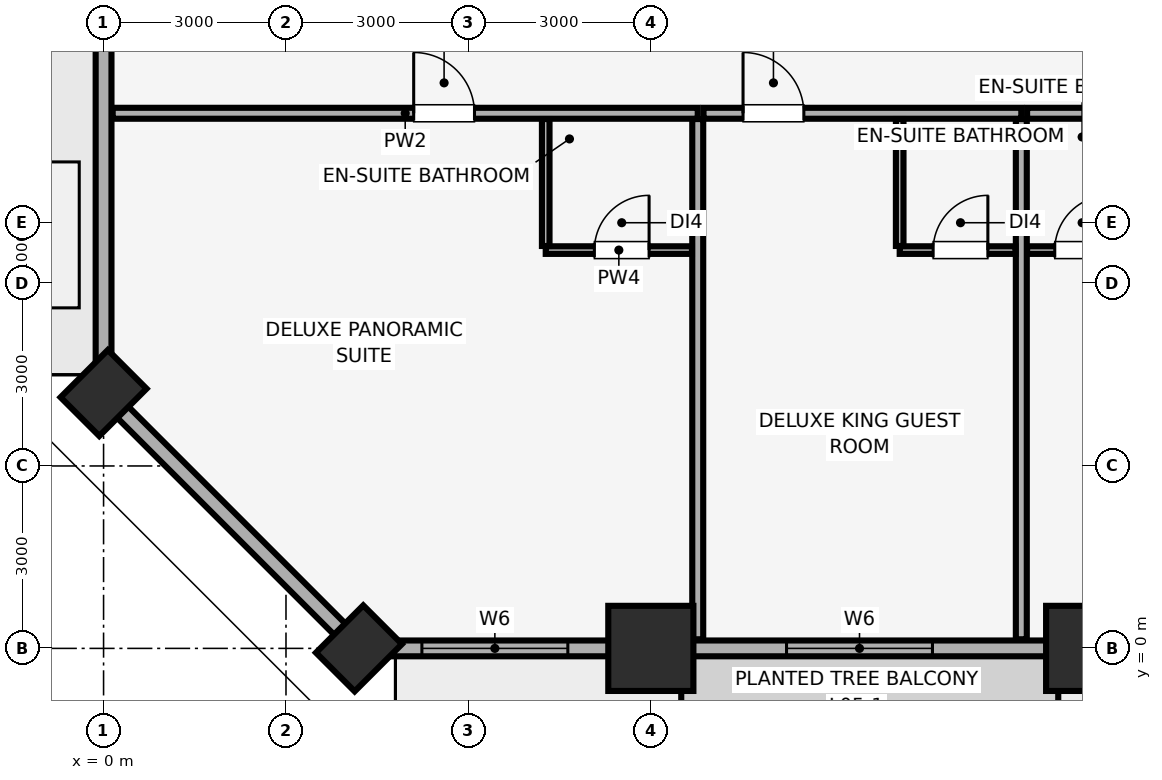
"""IFC4 building model, lengths in metres.
Left out: names, types, materials, properties, quantities, classifications, styles, units other than length and angle.
Written with IfcOpenShell. Run it as: python <this file> out.ifc"""

import sys

from ifc_helpers import new_model, si_unit, direction, frame, frame_2d, origin, origin_2d, place, context, subcontext, project, spatial, rectangle, extrude, element, fill, save


model = new_model("IFC4")
c1 = context("Model", 3, precision=1e-05, world=origin(), true_north=direction((0.0, 1.0)))
c2 = subcontext(c1, "Body", "Model", "MODEL_VIEW")
j1 = project(units=[si_unit("LENGTHUNIT", "METRE"), si_unit("PLANEANGLEUNIT", "RADIAN")], contexts=[c1])
p1 = place(None, origin())
s1 = spatial("IfcSite", under=j1, at=p1, CompositionType="ELEMENT")
p2 = place(p1, origin())
s2 = spatial("IfcBuilding", under=s1, at=p2, CompositionType="ELEMENT")
p3 = place(p2, frame((0.0, 0.0, 31.4)))
s3 = spatial("IfcBuildingStorey", under=s2, at=p3, CompositionType="ELEMENT", Elevation=31.4)
for number, where, z_axis, x_axis in (
    (1, (9.0, 0.0, 0.0), (0.0, 0.0, 1.0), (1.0, 0.0, 0.0)),
    (2, (16.2, 0.0, 0.0), (0.0, 0.0, 1.0), (1.0, 0.0, 0.0)),
):
    element("IfcColumn", number, at=place(p3, frame(where, z_axis=z_axis, x_axis=x_axis)), inside=s3, PredefinedType="COLUMN", context=c2, shape_type="SweptSolid", body=[
        extrude(rectangle(XDim=1.4, YDim=1.4, at=origin_2d()), origin(), (0.0, 0.0, 1.0), 3.51),
    ])
for number, where, z_axis, x_axis in (
    (3, (4.2, 0.0, 0.0), (0.0, 0.0, 1.0), (0.707, 0.707, 0.0)),
    (4, (0.0, 4.2, 0.0), (0.0, 0.0, 1.0), (0.707, 0.707, 0.0)),
):
    element("IfcColumn", number, at=place(p3, frame(where, z_axis=z_axis, x_axis=x_axis)), inside=s3, PredefinedType="PILASTER", context=c2, shape_type="SweptSolid", body=[
        extrude(rectangle(XDim=1.1, YDim=0.9, at=origin_2d()), origin(), (0.0, 0.0, 1.0), 3.51),
    ])
p4 = place(p3, frame((4.2, 0.0, 0.0), z_axis=(0.0, 0.0, 1.0), x_axis=(1.0, 0.0, 0.0)))
e5 = element("IfcWall", 5, at=p4, inside=s3, PredefinedType="SOLIDWALL", context=c2, shape_type="SweptSolid", body=[
    extrude(rectangle(XDim=75.6, YDim=0.26, at=frame_2d((37.8, 0.0))), origin(), (0.0, 0.0, 1.0), 2.56),
])
p5 = place(p4, frame((13.517, 0.0, 0.0)))
e6 = element("IfcOpeningElement", 6, at=p5, cuts=e5, PredefinedType="OPENING", context=c2, shape_type="SweptSolid", body=[
    extrude(rectangle(XDim=1.1, YDim=2.15, at=frame_2d((0.55, 1.075))), frame((0.0, 0.14, 0.0), z_axis=(0.0, -1.0, 0.0), x_axis=(1.0, 0.0, 0.0)), (0.0, 0.0, 1.0), 0.28),
])
p6 = place(p4, frame((28.183, 0.0, 0.0)))
e7 = element("IfcOpeningElement", 7, at=p6, cuts=e5, PredefinedType="OPENING", context=c2, shape_type="SweptSolid", body=[
    extrude(rectangle(XDim=1.1, YDim=2.15, at=frame_2d((0.55, 1.075))), frame((0.0, 0.14, 0.0), z_axis=(0.0, -1.0, 0.0), x_axis=(1.0, 0.0, 0.0)), (0.0, 0.0, 1.0), 0.28),
])
p7 = place(p4, frame((60.983, 0.0, 0.0)))
e8 = element("IfcOpeningElement", 8, at=p7, cuts=e5, PredefinedType="OPENING", context=c2, shape_type="SweptSolid", body=[
    extrude(rectangle(XDim=1.1, YDim=2.15, at=frame_2d((0.55, 1.075))), frame((0.0, 0.14, 0.0), z_axis=(0.0, -1.0, 0.0), x_axis=(1.0, 0.0, 0.0)), (0.0, 0.0, 1.0), 0.28),
])
p8 = place(p4, frame((1.035, 0.0, 0.85)))
e9 = element("IfcOpeningElement", 9, at=p8, cuts=e5, PredefinedType="OPENING", context=c2, shape_type="SweptSolid", body=[
    extrude(rectangle(XDim=2.4, YDim=1.5, at=frame_2d((1.2, 0.75))), frame((0.0, 0.14, 0.0), z_axis=(0.0, -1.0, 0.0), x_axis=(1.0, 0.0, 0.0)), (0.0, 0.0, 1.0), 0.28),
])
p9 = place(p4, frame((7.031, 0.0, 0.85)))
e10 = element("IfcOpeningElement", 10, at=p9, cuts=e5, PredefinedType="OPENING", context=c2, shape_type="SweptSolid", body=[
    extrude(rectangle(XDim=2.4, YDim=1.5, at=frame_2d((1.2, 0.75))), frame((0.0, 0.14, 0.0), z_axis=(0.0, -1.0, 0.0), x_axis=(1.0, 0.0, 0.0)), (0.0, 0.0, 1.0), 0.28),
])
p10 = place(p4, frame((16.757, 0.0, 0.85)))
e11 = element("IfcOpeningElement", 11, at=p10, cuts=e5, PredefinedType="OPENING", context=c2, shape_type="SweptSolid", body=[
    extrude(rectangle(XDim=1.5, YDim=1.4, at=frame_2d((0.75, 0.7))), frame((0.0, 0.14, 0.0), z_axis=(0.0, -1.0, 0.0), x_axis=(1.0, 0.0, 0.0)), (0.0, 0.0, 1.0), 0.28),
])
p11 = place(p4, frame((22.567, 0.0, 0.85)))
e12 = element("IfcOpeningElement", 12, at=p11, cuts=e5, PredefinedType="OPENING", context=c2, shape_type="SweptSolid", body=[
    extrude(rectangle(XDim=2.4, YDim=1.5, at=frame_2d((1.2, 0.75))), frame((0.0, 0.14, 0.0), z_axis=(0.0, -1.0, 0.0), x_axis=(1.0, 0.0, 0.0)), (0.0, 0.0, 1.0), 0.28),
])
p12 = place(p4, frame((30.065, 0.0, 0.85)))
e13 = element("IfcOpeningElement", 13, at=p12, cuts=e5, PredefinedType="OPENING", context=c2, shape_type="SweptSolid", body=[
    extrude(rectangle(XDim=1.5, YDim=1.4, at=frame_2d((0.75, 0.7))), frame((0.0, 0.14, 0.0), z_axis=(0.0, -1.0, 0.0), x_axis=(1.0, 0.0, 0.0)), (0.0, 0.0, 1.0), 0.28),
])
p13 = place(p4, frame((34.55, 0.0, 0.85)))
e14 = element("IfcOpeningElement", 14, at=p13, cuts=e5, PredefinedType="OPENING", context=c2, shape_type="SweptSolid", body=[
    extrude(rectangle(XDim=2.4, YDim=1.5, at=frame_2d((1.2, 0.75))), frame((0.0, 0.14, 0.0), z_axis=(0.0, -1.0, 0.0), x_axis=(1.0, 0.0, 0.0)), (0.0, 0.0, 1.0), 0.28),
])
p14 = place(p4, frame((38.35, 0.0, 0.85)))
e15 = element("IfcOpeningElement", 15, at=p14, cuts=e5, PredefinedType="OPENING", context=c2, shape_type="SweptSolid", body=[
    extrude(rectangle(XDim=2.4, YDim=1.5, at=frame_2d((1.2, 0.75))), frame((0.0, 0.14, 0.0), z_axis=(0.0, -1.0, 0.0), x_axis=(1.0, 0.0, 0.0)), (0.0, 0.0, 1.0), 0.28),
])
p15 = place(p4, frame((44.281, 0.0, 0.85)))
e16 = element("IfcOpeningElement", 16, at=p15, cuts=e5, PredefinedType="OPENING", context=c2, shape_type="SweptSolid", body=[
    extrude(rectangle(XDim=2.4, YDim=1.5, at=frame_2d((1.2, 0.75))), frame((0.0, 0.14, 0.0), z_axis=(0.0, -1.0, 0.0), x_axis=(1.0, 0.0, 0.0)), (0.0, 0.0, 1.0), 0.28),
])
p16 = place(p4, frame((50.332, 0.0, 0.85)))
e17 = element("IfcOpeningElement", 17, at=p16, cuts=e5, PredefinedType="OPENING", context=c2, shape_type="SweptSolid", body=[
    extrude(rectangle(XDim=2.4, YDim=1.5, at=frame_2d((1.2, 0.75))), frame((0.0, 0.14, 0.0), z_axis=(0.0, -1.0, 0.0), x_axis=(1.0, 0.0, 0.0)), (0.0, 0.0, 1.0), 0.28),
])
p17 = place(p4, frame((53.981, 0.0, 0.85)))
e18 = element("IfcOpeningElement", 18, at=p17, cuts=e5, PredefinedType="OPENING", context=c2, shape_type="SweptSolid", body=[
    extrude(rectangle(XDim=1.5, YDim=1.4, at=frame_2d((0.75, 0.7))), frame((0.0, 0.14, 0.0), z_axis=(0.0, -1.0, 0.0), x_axis=(1.0, 0.0, 0.0)), (0.0, 0.0, 1.0), 0.28),
])
p18 = place(p4, frame((64.759, 0.0, 0.85)))
e19 = element("IfcOpeningElement", 19, at=p18, cuts=e5, PredefinedType="OPENING", context=c2, shape_type="SweptSolid", body=[
    extrude(rectangle(XDim=1.5, YDim=1.4, at=frame_2d((0.75, 0.7))), frame((0.0, 0.14, 0.0), z_axis=(0.0, -1.0, 0.0), x_axis=(1.0, 0.0, 0.0)), (0.0, 0.0, 1.0), 0.28),
])
p19 = place(p4, frame((67.509, 0.0, 0.85)))
e20 = element("IfcOpeningElement", 20, at=p19, cuts=e5, PredefinedType="OPENING", context=c2, shape_type="SweptSolid", body=[
    extrude(rectangle(XDim=2.4, YDim=1.5, at=frame_2d((1.2, 0.75))), frame((0.0, 0.14, 0.0), z_axis=(0.0, -1.0, 0.0), x_axis=(1.0, 0.0, 0.0)), (0.0, 0.0, 1.0), 0.28),
])
p20 = place(p4, frame((72.165, 0.0, 0.85)))
e21 = element("IfcOpeningElement", 21, at=p20, cuts=e5, PredefinedType="OPENING", context=c2, shape_type="SweptSolid", body=[
    extrude(rectangle(XDim=2.4, YDim=1.5, at=frame_2d((1.2, 0.75))), frame((0.0, 0.14, 0.0), z_axis=(0.0, -1.0, 0.0), x_axis=(1.0, 0.0, 0.0)), (0.0, 0.0, 1.0), 0.28),
])
p21 = place(p3, frame((0.0, 44.8, 0.0), z_axis=(0.0, 0.0, 1.0), x_axis=(0.0, -1.0, 0.0)))
e22 = element("IfcWall", 22, at=p21, inside=s3, PredefinedType="SOLIDWALL", context=c2, shape_type="SweptSolid", body=[
    extrude(rectangle(XDim=40.6, YDim=0.26, at=frame_2d((20.3, 0.0))), origin(), (0.0, 0.0, 1.0), 2.56),
])
p22 = place(p21, frame((21.9, 0.0, 0.0)))
e23 = element("IfcOpeningElement", 23, at=p22, cuts=e22, PredefinedType="OPENING", context=c2, shape_type="SweptSolid", body=[
    extrude(rectangle(XDim=1.4, YDim=2.2, at=frame_2d((0.7, 1.1))), frame((0.0, 0.14, 0.0), z_axis=(0.0, -1.0, 0.0), x_axis=(1.0, 0.0, 0.0)), (0.0, 0.0, 1.0), 0.28),
])
p23 = place(p21, frame((31.425, 0.0, 0.85)))
e24 = element("IfcOpeningElement", 24, at=p23, cuts=e22, PredefinedType="OPENING", context=c2, shape_type="SweptSolid", body=[
    extrude(rectangle(XDim=1.5, YDim=1.4, at=frame_2d((0.75, 0.7))), frame((0.0, 0.14, 0.0), z_axis=(0.0, -1.0, 0.0), x_axis=(1.0, 0.0, 0.0)), (0.0, 0.0, 1.0), 0.28),
])
p24 = place(p21, frame((26.34, 0.0, 0.85)))
e25 = element("IfcOpeningElement", 25, at=p24, cuts=e22, PredefinedType="OPENING", context=c2, shape_type="SweptSolid", body=[
    extrude(rectangle(XDim=1.5, YDim=1.4, at=frame_2d((0.75, 0.7))), frame((0.0, 0.14, 0.0), z_axis=(0.0, -1.0, 0.0), x_axis=(1.0, 0.0, 0.0)), (0.0, 0.0, 1.0), 0.28),
])
p25 = place(p21, frame((17.99, 0.0, 0.85)))
e26 = element("IfcOpeningElement", 26, at=p25, cuts=e22, PredefinedType="OPENING", context=c2, shape_type="SweptSolid", body=[
    extrude(rectangle(XDim=1.5, YDim=1.4, at=frame_2d((0.75, 0.7))), frame((0.0, 0.14, 0.0), z_axis=(0.0, -1.0, 0.0), x_axis=(1.0, 0.0, 0.0)), (0.0, 0.0, 1.0), 0.28),
])
p26 = place(p21, frame((11.05, 0.0, 0.85)))
e27 = element("IfcOpeningElement", 27, at=p26, cuts=e22, PredefinedType="OPENING", context=c2, shape_type="SweptSolid", body=[
    extrude(rectangle(XDim=1.5, YDim=1.4, at=frame_2d((0.75, 0.7))), frame((0.0, 0.14, 0.0), z_axis=(0.0, -1.0, 0.0), x_axis=(1.0, 0.0, 0.0)), (0.0, 0.0, 1.0), 0.28),
])
p27 = place(p21, frame((6.35, 0.0, 0.85)))
e28 = element("IfcOpeningElement", 28, at=p27, cuts=e22, PredefinedType="OPENING", context=c2, shape_type="SweptSolid", body=[
    extrude(rectangle(XDim=1.5, YDim=1.4, at=frame_2d((0.75, 0.7))), frame((0.0, 0.14, 0.0), z_axis=(0.0, -1.0, 0.0), x_axis=(1.0, 0.0, 0.0)), (0.0, 0.0, 1.0), 0.28),
])
p28 = place(p21, frame((1.735, 0.0, 0.85)))
e29 = element("IfcOpeningElement", 29, at=p28, cuts=e22, PredefinedType="OPENING", context=c2, shape_type="SweptSolid", body=[
    extrude(rectangle(XDim=1.5, YDim=1.4, at=frame_2d((0.75, 0.7))), frame((0.0, 0.14, 0.0), z_axis=(0.0, -1.0, 0.0), x_axis=(1.0, 0.0, 0.0)), (0.0, 0.0, 1.0), 0.28),
])
p29 = place(p3, frame((0.0, 4.2, 0.0), z_axis=(0.0, 0.0, 1.0), x_axis=(0.707106781187, -0.707106781187, 0.0)))
e30 = element("IfcWall", 30, at=p29, inside=s3, PredefinedType="SOLIDWALL", context=c2, shape_type="SweptSolid", body=[
    extrude(rectangle(XDim=5.94, YDim=0.26, at=frame_2d((2.97, 0.0))), origin(), (0.0, 0.0, 1.0), 2.56),
])
p30 = place(p3, frame((0.15, 8.8, 0.0), z_axis=(0.0, 0.0, 1.0), x_axis=(1.0, 0.0, 0.0)))
e31 = element("IfcWall", 31, at=p30, inside=s3, PredefinedType="PARTITIONING", context=c2, shape_type="SweptSolid", body=[
    extrude(rectangle(XDim=9.621, YDim=0.18, at=frame_2d((4.811, 0.0))), origin(), (0.0, 0.0, 1.0), 3.51),
])
p31 = place(p30, frame((4.95, 0.0, 0.0)))
e32 = element("IfcOpeningElement", 32, at=p31, cuts=e31, PredefinedType="OPENING", context=c2, shape_type="SweptSolid", body=[
    extrude(rectangle(XDim=1.0, YDim=2.15, at=frame_2d((0.5, 1.075))), frame((0.0, 0.1, 0.0), z_axis=(0.0, -1.0, 0.0), x_axis=(1.0, 0.0, 0.0)), (0.0, 0.0, 1.0), 0.2),
])
p32 = place(p3, frame((9.771, 0.15, 0.0), z_axis=(0.0, 0.0, 1.0), x_axis=(0.0, 1.0, 0.0)))
e33 = element("IfcWall", 33, at=p32, inside=s3, PredefinedType="PARTITIONING", context=c2, shape_type="SweptSolid", body=[
    extrude(rectangle(XDim=8.555, YDim=0.18, at=frame_2d((4.278, 0.0))), origin(), (0.0, 0.0, 1.0), 2.88),
])
p33 = place(p3, frame((7.271, 6.55, 0.0), z_axis=(0.0, 0.0, 1.0), x_axis=(1.0, 0.0, 0.0)))
e34 = element("IfcWall", 34, at=p33, inside=s3, PredefinedType="PARTITIONING", context=c2, shape_type="SweptSolid", body=[
    extrude(rectangle(XDim=2.405, YDim=0.125, at=frame_2d((1.203, 0.0))), origin(), (0.0, 0.0, 1.0), 3.51),
])
p34 = place(p33, frame((0.8, 0.0, 0.0)))
e35 = element("IfcOpeningElement", 35, at=p34, cuts=e34, PredefinedType="OPENING", context=c2, shape_type="SweptSolid", body=[
    extrude(rectangle(XDim=0.9, YDim=2.1, at=frame_2d((0.45, 1.05))), frame((0.0, 0.073, 0.0), z_axis=(0.0, -1.0, 0.0), x_axis=(1.0, 0.0, 0.0)), (0.0, 0.0, 1.0), 0.145),
])
p35 = place(p3, frame((7.271, 6.617, 0.0), z_axis=(0.0, 0.0, 1.0), x_axis=(0.0, 1.0, 0.0)))
e36 = element("IfcWall", 36, at=p35, inside=s3, PredefinedType="PARTITIONING", context=c2, shape_type="SweptSolid", body=[
    extrude(rectangle(XDim=2.088, YDim=0.125, at=frame_2d((1.044, 0.0))), origin(), (0.0, 0.0, 1.0), 3.51),
])
p36 = place(p3, frame((9.866, 8.8, 0.0), z_axis=(0.0, 0.0, 1.0), x_axis=(1.0, 0.0, 0.0)))
e37 = element("IfcWall", 37, at=p36, inside=s3, PredefinedType="PARTITIONING", context=c2, shape_type="SweptSolid", body=[
    extrude(rectangle(XDim=5.226, YDim=0.18, at=frame_2d((2.613, 0.0))), origin(), (0.0, 0.0, 1.0), 3.51),
])
p37 = place(p36, frame((0.65, 0.0, 0.0)))
e38 = element("IfcOpeningElement", 38, at=p37, cuts=e37, PredefinedType="OPENING", context=c2, shape_type="SweptSolid", body=[
    extrude(rectangle(XDim=1.0, YDim=2.15, at=frame_2d((0.5, 1.075))), frame((0.0, 0.1, 0.0), z_axis=(0.0, -1.0, 0.0), x_axis=(1.0, 0.0, 0.0)), (0.0, 0.0, 1.0), 0.2),
])
p38 = place(p3, frame((15.093, 0.15, 0.0), z_axis=(0.0, 0.0, 1.0), x_axis=(0.0, 1.0, 0.0)))
e39 = element("IfcWall", 39, at=p38, inside=s3, PredefinedType="PARTITIONING", context=c2, shape_type="SweptSolid", body=[
    extrude(rectangle(XDim=8.555, YDim=0.18, at=frame_2d((4.278, 0.0))), origin(), (0.0, 0.0, 1.0), 3.51),
])
p39 = place(p3, frame((13.093, 6.55, 0.0), z_axis=(0.0, 0.0, 1.0), x_axis=(1.0, 0.0, 0.0)))
e40 = element("IfcWall", 40, at=p39, inside=s3, PredefinedType="PARTITIONING", context=c2, shape_type="SweptSolid", body=[
    extrude(rectangle(XDim=1.905, YDim=0.125, at=frame_2d((0.953, 0.0))), origin(), (0.0, 0.0, 1.0), 3.51),
])
p40 = place(p39, frame((0.55, 0.0, 0.0)))
e41 = element("IfcOpeningElement", 41, at=p40, cuts=e40, PredefinedType="OPENING", context=c2, shape_type="SweptSolid", body=[
    extrude(rectangle(XDim=0.9, YDim=2.1, at=frame_2d((0.45, 1.05))), frame((0.0, 0.073, 0.0), z_axis=(0.0, -1.0, 0.0), x_axis=(1.0, 0.0, 0.0)), (0.0, 0.0, 1.0), 0.145),
])
p41 = place(p3, frame((13.093, 6.617, 0.0), z_axis=(0.0, 0.0, 1.0), x_axis=(0.0, 1.0, 0.0)))
e42 = element("IfcWall", 42, at=p41, inside=s3, PredefinedType="PARTITIONING", context=c2, shape_type="SweptSolid", body=[
    extrude(rectangle(XDim=2.088, YDim=0.125, at=frame_2d((1.044, 0.0))), origin(), (0.0, 0.0, 1.0), 3.51),
])
p42 = place(p3, frame((15.188, 8.8, 0.0), z_axis=(0.0, 0.0, 1.0), x_axis=(1.0, 0.0, 0.0)))
e43 = element("IfcWall", 43, at=p42, inside=s3, PredefinedType="PARTITIONING", context=c2, shape_type="SweptSolid", body=[
    extrude(rectangle(XDim=5.226, YDim=0.18, at=frame_2d((2.613, 0.0))), origin(), (0.0, 0.0, 1.0), 3.51),
])
p43 = place(p42, frame((3.516, 0.0, 0.0)))
e44 = element("IfcOpeningElement", 44, at=p43, cuts=e43, PredefinedType="OPENING", context=c2, shape_type="SweptSolid", body=[
    extrude(rectangle(XDim=1.0, YDim=2.15, at=frame_2d((0.5, 1.075))), frame((0.0, 0.1, 0.0), z_axis=(0.0, -1.0, 0.0), x_axis=(1.0, 0.0, 0.0)), (0.0, 0.0, 1.0), 0.2),
])
p44 = place(p3, frame((15.188, 6.55, 0.0), z_axis=(0.0, 0.0, 1.0), x_axis=(1.0, 0.0, 0.0)))
e45 = element("IfcWall", 45, at=p44, inside=s3, PredefinedType="PARTITIONING", context=c2, shape_type="SweptSolid", body=[
    extrude(rectangle(XDim=1.905, YDim=0.125, at=frame_2d((0.953, 0.0))), origin(), (0.0, 0.0, 1.0), 3.51),
])
p45 = place(p44, frame((0.455, 0.0, 0.0)))
e46 = element("IfcOpeningElement", 46, at=p45, cuts=e45, PredefinedType="OPENING", context=c2, shape_type="SweptSolid", body=[
    extrude(rectangle(XDim=0.9, YDim=2.1, at=frame_2d((0.45, 1.05))), frame((0.0, 0.073, 0.0), z_axis=(0.0, -1.0, 0.0), x_axis=(1.0, 0.0, 0.0)), (0.0, 0.0, 1.0), 0.145),
])
p46 = place(p3, frame((0.0, 0.0, -0.28)))
p47 = place(p46, frame((-1.6, 6.8, 0.23)))
e47 = element("IfcWindow", 47, at=p47, inside=s3, PartitioningType="SINGLE_PANEL", PredefinedType="SKYLIGHT", context=c2, shape_type="SweptSolid", body=[
    extrude(rectangle(XDim=2.4, YDim=2.4, at=origin_2d()), origin(), (0.0, 0.0, 1.0), 0.05),
])
p48 = place(p8, origin())
e48 = element("IfcWindow", 48, at=p48, inside=s3, PartitioningType="SINGLE_PANEL", PredefinedType="WINDOW", context=c2, shape_type="SweptSolid", body=[
    extrude(rectangle(XDim=2.4, YDim=1.5, at=frame_2d((1.2, 0.75))), frame((0.0, 0.03, 0.0), z_axis=(0.0, -1.0, 0.0), x_axis=(1.0, 0.0, 0.0)), (0.0, 0.0, 1.0), 0.06),
])
fill(e9, e48)
p49 = place(p9, origin())
e49 = element("IfcWindow", 49, at=p49, inside=s3, PartitioningType="SINGLE_PANEL", PredefinedType="WINDOW", context=c2, shape_type="SweptSolid", body=[
    extrude(rectangle(XDim=2.4, YDim=1.5, at=frame_2d((1.2, 0.75))), frame((0.0, 0.03, 0.0), z_axis=(0.0, -1.0, 0.0), x_axis=(1.0, 0.0, 0.0)), (0.0, 0.0, 1.0), 0.06),
])
fill(e10, e49)
p50 = place(p31, origin())
e50 = element("IfcDoor", 50, at=p50, inside=s3, OperationType="SINGLE_SWING_LEFT", PredefinedType="DOOR", context=c2, shape_type="SweptSolid", body=[
    extrude(rectangle(XDim=1.0, YDim=2.15, at=frame_2d((0.5, 1.075))), frame((0.0, 0.025, 0.0), z_axis=(0.0, -1.0, 0.0), x_axis=(1.0, 0.0, 0.0)), (0.0, 0.0, 1.0), 0.05),
])
fill(e32, e50)
p51 = place(p34, origin())
e51 = element("IfcDoor", 51, at=p51, inside=s3, OperationType="SINGLE_SWING_RIGHT", PredefinedType="DOOR", context=c2, shape_type="SweptSolid", body=[
    extrude(rectangle(XDim=0.9, YDim=2.1, at=frame_2d((0.45, 1.05))), frame((0.0, 0.025, 0.0), z_axis=(0.0, -1.0, 0.0), x_axis=(1.0, 0.0, 0.0)), (0.0, 0.0, 1.0), 0.05),
])
fill(e35, e51)
p52 = place(p37, origin())
e52 = element("IfcDoor", 52, at=p52, inside=s3, OperationType="SINGLE_SWING_LEFT", PredefinedType="DOOR", context=c2, shape_type="SweptSolid", body=[
    extrude(rectangle(XDim=1.0, YDim=2.15, at=frame_2d((0.5, 1.075))), frame((0.0, 0.025, 0.0), z_axis=(0.0, -1.0, 0.0), x_axis=(1.0, 0.0, 0.0)), (0.0, 0.0, 1.0), 0.05),
])
fill(e38, e52)
p53 = place(p40, origin())
e53 = element("IfcDoor", 53, at=p53, inside=s3, OperationType="SINGLE_SWING_RIGHT", PredefinedType="DOOR", context=c2, shape_type="SweptSolid", body=[
    extrude(rectangle(XDim=0.9, YDim=2.1, at=frame_2d((0.45, 1.05))), frame((0.0, 0.025, 0.0), z_axis=(0.0, -1.0, 0.0), x_axis=(1.0, 0.0, 0.0)), (0.0, 0.0, 1.0), 0.05),
])
fill(e41, e53)
p54 = place(p45, origin())
e54 = element("IfcDoor", 54, at=p54, inside=s3, OperationType="SINGLE_SWING_RIGHT", PredefinedType="DOOR", context=c2, shape_type="SweptSolid", body=[
    extrude(rectangle(XDim=0.9, YDim=2.1, at=frame_2d((0.45, 1.05))), frame((0.0, 0.025, 0.0), z_axis=(0.0, -1.0, 0.0), x_axis=(1.0, 0.0, 0.0)), (0.0, 0.0, 1.0), 0.05),
])
fill(e46, e54)
save(model, sys.argv[1])
